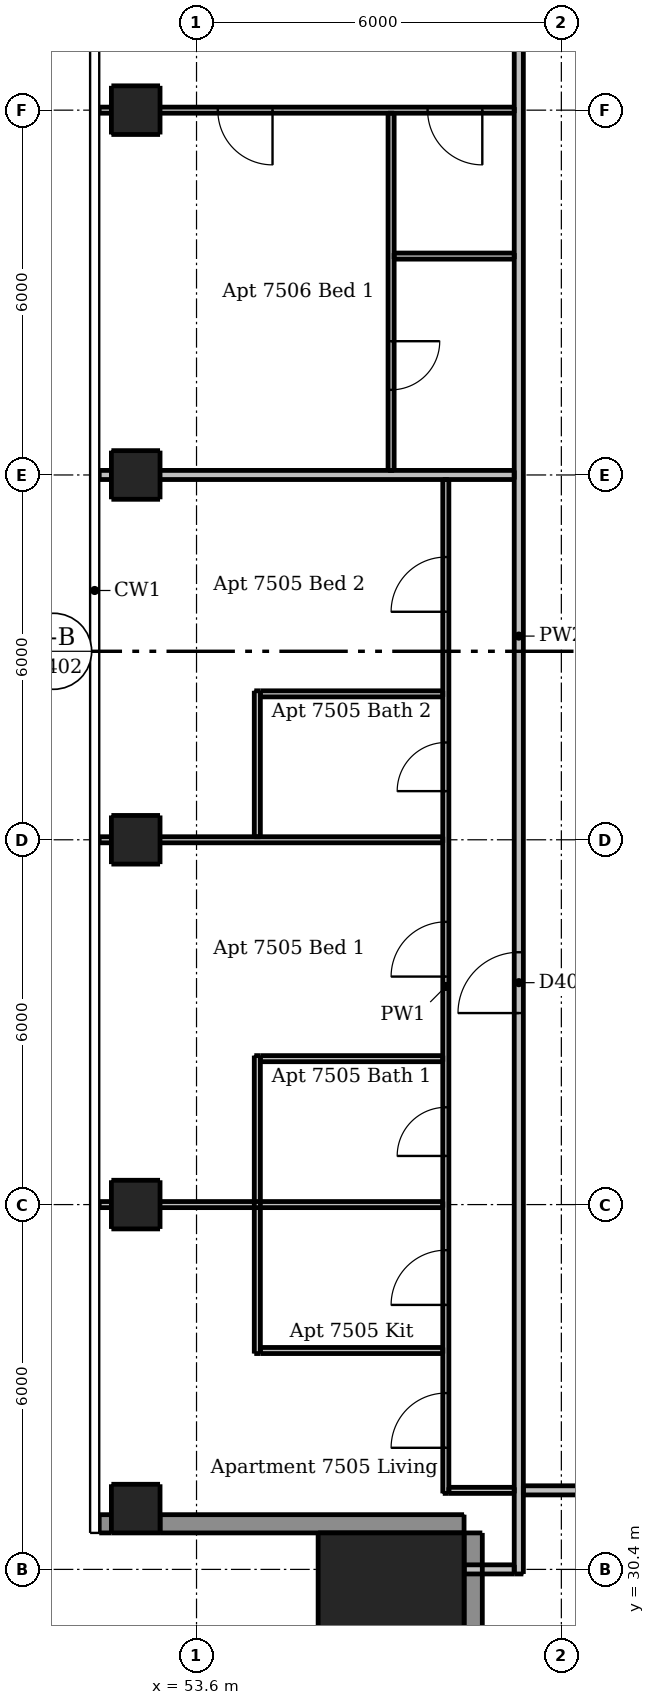
"""IFC4 building model, lengths in metres.
Left out: names, types, materials, properties, quantities, classifications, styles, units other than length and angle.
Written with IfcOpenShell. Run it as: python <this file> out.ifc"""

import sys

from ifc_helpers import new_model, si_unit, direction, frame, frame_2d, origin, origin_2d, place, context, subcontext, project, spatial, rectangle, extrude, element, fill, save


model = new_model("IFC4")
c1 = context("Model", 3, precision=1e-05, world=origin(), true_north=direction((0.0, 1.0)))
c2 = subcontext(c1, "Body", "Model", "MODEL_VIEW")
j1 = project(units=[si_unit("LENGTHUNIT", "METRE"), si_unit("PLANEANGLEUNIT", "RADIAN")], contexts=[c1])
p1 = place(None, origin())
s1 = spatial("IfcSite", under=j1, at=p1, CompositionType="ELEMENT")
p2 = place(p1, origin())
s2 = spatial("IfcBuilding", under=s1, at=p2, CompositionType="ELEMENT")
p3 = place(p2, frame((0.0, 0.0, 278.5)))
s3 = spatial("IfcBuildingStorey", under=s2, at=p3, CompositionType="ELEMENT", Elevation=278.5)
for number, where, z_axis, x_axis in (
    (1, (52.6, 31.4, 0.0), (0.0, 0.0, 1.0), (1.0, 0.0, 0.0)),
    (2, (52.6, 36.4, 0.0), (0.0, 0.0, 1.0), (1.0, 0.0, 0.0)),
    (3, (52.6, 42.4, 0.0), (0.0, 0.0, 1.0), (1.0, 0.0, 0.0)),
    (4, (52.6, 48.4, 0.0), (0.0, 0.0, 1.0), (1.0, 0.0, 0.0)),
    (5, (52.6, 54.4, 0.0), (0.0, 0.0, 1.0), (1.0, 0.0, 0.0)),
):
    element("IfcColumn", number, at=place(p3, frame(where, z_axis=z_axis, x_axis=x_axis)), inside=s3, PredefinedType="COLUMN", context=c2, shape_type="SweptSolid", body=[
        extrude(rectangle(XDim=0.8, YDim=0.8, at=origin_2d()), origin(), (0.0, 0.0, 1.0), 3.0),
    ])
p4 = place(p3, frame((56.8, 29.8, 0.0), z_axis=(0.0, 0.0, 1.0), x_axis=(1.0, 0.0, 0.0)))
e6 = element("IfcColumn", 6, at=p4, inside=s3, PredefinedType="COLUMN", context=c2, shape_type="SweptSolid", body=[
    extrude(rectangle(XDim=2.4, YDim=2.4, at=origin_2d()), origin(), (0.0, 0.0, 1.0), 3.3),
])
p5 = place(p3, frame((52.0, 31.15, 0.0), z_axis=(0.0, 0.0, 1.0), x_axis=(1.0, 0.0, 0.0)))
e7 = element("IfcWall", 7, at=p5, inside=s3, PredefinedType="SOLIDWALL", context=c2, shape_type="SweptSolid", body=[
    extrude(rectangle(XDim=0.2, YDim=0.3, at=frame_2d((0.1, 0.0))), origin(), (0.0, 0.0, 1.0), 3.0),
])
p6 = place(p3, frame((53.0, 31.15, 0.0), z_axis=(0.0, 0.0, 1.0), x_axis=(1.0, 0.0, 0.0)))
e8 = element("IfcWall", 8, at=p6, inside=s3, PredefinedType="SOLIDWALL", context=c2, shape_type="SweptSolid", body=[
    extrude(rectangle(XDim=5.0, YDim=0.3, at=frame_2d((2.5, 0.0))), origin(), (0.0, 0.0, 1.0), 3.0),
])
p7 = place(p3, frame((58.15, 31.0, 0.0), z_axis=(0.0, 0.0, 1.0), x_axis=(0.0, -1.0, 0.0)))
e9 = element("IfcWall", 9, at=p7, inside=s3, PredefinedType="SOLIDWALL", context=c2, shape_type="SweptSolid", body=[
    extrude(rectangle(XDim=6.0, YDim=0.3, at=frame_2d((3.0, 0.0))), origin(), (0.0, 0.0, 1.0), 3.0),
])
p8 = place(p7, frame((1.8, 0.0, 0.15)))
e10 = element("IfcOpeningElement", 10, at=p8, cuts=e9, PredefinedType="OPENING", context=c2, shape_type="SweptSolid", body=[
    extrude(rectangle(XDim=2.4, YDim=2.1, at=frame_2d((1.2, 1.05))), frame((0.0, 0.16, 0.0), z_axis=(0.0, -1.0, 0.0), x_axis=(1.0, 0.0, 0.0)), (0.0, 0.0, 1.0), 0.32),
])
p9 = place(p3, frame((54.6, 33.95, 0.0), z_axis=(0.0, 0.0, 1.0), x_axis=(0.0, 1.0, 0.0)))
e11 = element("IfcWall", 11, at=p9, inside=s3, PredefinedType="PARTITIONING", context=c2, shape_type="SweptSolid", body=[
    extrude(rectangle(XDim=4.9, YDim=0.1, at=frame_2d((2.45, 0.0))), origin(), (0.0, 0.0, 1.0), 3.0),
])
p10 = place(p3, frame((54.6, 42.45, 0.0), z_axis=(0.0, 0.0, 1.0), x_axis=(0.0, 1.0, 0.0)))
e12 = element("IfcWall", 12, at=p10, inside=s3, PredefinedType="PARTITIONING", context=c2, shape_type="SweptSolid", body=[
    extrude(rectangle(XDim=2.4, YDim=0.1, at=frame_2d((1.2, 0.0))), origin(), (0.0, 0.0, 1.0), 3.0),
])
p11 = place(p3, frame((56.8, 54.35, 0.0), z_axis=(0.0, 0.0, 1.0), x_axis=(0.0, -1.0, 0.0)))
e13 = element("IfcWall", 13, at=p11, inside=s3, PredefinedType="PARTITIONING", context=c2, shape_type="SweptSolid", body=[
    extrude(rectangle(XDim=5.875, YDim=0.1, at=frame_2d((2.938, 0.0))), origin(), (0.0, 0.0, 1.0), 3.0),
])
p12 = place(p11, frame((3.75, 0.0, 0.0)))
e14 = element("IfcOpeningElement", 14, at=p12, cuts=e13, PredefinedType="OPENING", context=c2, shape_type="SweptSolid", body=[
    extrude(rectangle(XDim=0.8, YDim=2.1, at=frame_2d((0.4, 1.05))), frame((0.0, 0.06, 0.0), z_axis=(0.0, -1.0, 0.0), x_axis=(1.0, 0.0, 0.0)), (0.0, 0.0, 1.0), 0.12),
])
p13 = place(p3, frame((57.7, 31.65, 0.0), z_axis=(0.0, 0.0, 1.0), x_axis=(0.0, 1.0, 0.0)))
e15 = element("IfcWall", 15, at=p13, inside=s3, PredefinedType="PARTITIONING", context=c2, shape_type="SweptSolid", body=[
    extrude(rectangle(XDim=16.675, YDim=0.1, at=frame_2d((8.337, 0.0))), origin(), (0.0, 0.0, 1.0), 3.0),
])
p14 = place(p13, frame((0.75, 0.0, 0.0)))
e16 = element("IfcOpeningElement", 16, at=p14, cuts=e15, PredefinedType="OPENING", context=c2, shape_type="SweptSolid", body=[
    extrude(rectangle(XDim=0.9, YDim=2.1, at=frame_2d((0.45, 1.05))), frame((0.0, 0.06, 0.0), z_axis=(0.0, -1.0, 0.0), x_axis=(1.0, 0.0, 0.0)), (0.0, 0.0, 1.0), 0.12),
])
p15 = place(p13, frame((3.1, 0.0, 0.0)))
e17 = element("IfcOpeningElement", 17, at=p15, cuts=e15, PredefinedType="OPENING", context=c2, shape_type="SweptSolid", body=[
    extrude(rectangle(XDim=0.9, YDim=2.1, at=frame_2d((0.45, 1.05))), frame((0.0, 0.06, 0.0), z_axis=(0.0, -1.0, 0.0), x_axis=(1.0, 0.0, 0.0)), (0.0, 0.0, 1.0), 0.12),
])
p16 = place(p13, frame((8.5, 0.0, 0.0)))
e18 = element("IfcOpeningElement", 18, at=p16, cuts=e15, PredefinedType="OPENING", context=c2, shape_type="SweptSolid", body=[
    extrude(rectangle(XDim=0.9, YDim=2.1, at=frame_2d((0.45, 1.05))), frame((0.0, 0.06, 0.0), z_axis=(0.0, -1.0, 0.0), x_axis=(1.0, 0.0, 0.0)), (0.0, 0.0, 1.0), 0.12),
])
p17 = place(p13, frame((14.5, 0.0, 0.0)))
e19 = element("IfcOpeningElement", 19, at=p17, cuts=e15, PredefinedType="OPENING", context=c2, shape_type="SweptSolid", body=[
    extrude(rectangle(XDim=0.9, YDim=2.1, at=frame_2d((0.45, 1.05))), frame((0.0, 0.06, 0.0), z_axis=(0.0, -1.0, 0.0), x_axis=(1.0, 0.0, 0.0)), (0.0, 0.0, 1.0), 0.12),
])
p18 = place(p13, frame((5.55, 0.0, 0.0)))
e20 = element("IfcOpeningElement", 20, at=p18, cuts=e15, PredefinedType="OPENING", context=c2, shape_type="SweptSolid", body=[
    extrude(rectangle(XDim=0.8, YDim=2.1, at=frame_2d((0.4, 1.05))), frame((0.0, 0.06, 0.0), z_axis=(0.0, -1.0, 0.0), x_axis=(1.0, 0.0, 0.0)), (0.0, 0.0, 1.0), 0.12),
])
p19 = place(p13, frame((11.55, 0.0, 0.0)))
e21 = element("IfcOpeningElement", 21, at=p19, cuts=e15, PredefinedType="OPENING", context=c2, shape_type="SweptSolid", body=[
    extrude(rectangle(XDim=0.8, YDim=2.1, at=frame_2d((0.4, 1.05))), frame((0.0, 0.06, 0.0), z_axis=(0.0, -1.0, 0.0), x_axis=(1.0, 0.0, 0.0)), (0.0, 0.0, 1.0), 0.12),
])
p20 = place(p3, frame((58.825, 54.4, 0.0), z_axis=(0.0, 0.0, 1.0), x_axis=(-1.0, 0.0, 0.0)))
e22 = element("IfcWall", 22, at=p20, inside=s3, PredefinedType="PARTITIONING", context=c2, shape_type="SweptSolid", body=[
    extrude(rectangle(XDim=6.825, YDim=0.1, at=frame_2d((3.413, 0.0))), origin(), (0.0, 0.0, 1.0), 2.466),
])
p21 = place(p20, frame((0.525, 0.0, 0.0)))
e23 = element("IfcOpeningElement", 23, at=p21, cuts=e22, PredefinedType="OPENING", context=c2, shape_type="SweptSolid", body=[
    extrude(rectangle(XDim=0.9, YDim=2.1, at=frame_2d((0.45, 1.05))), frame((0.0, 0.06, 0.0), z_axis=(0.0, -1.0, 0.0), x_axis=(1.0, 0.0, 0.0)), (0.0, 0.0, 1.0), 0.12),
])
p22 = place(p20, frame((3.975, 0.0, 0.0)))
e24 = element("IfcOpeningElement", 24, at=p22, cuts=e22, PredefinedType="OPENING", context=c2, shape_type="SweptSolid", body=[
    extrude(rectangle(XDim=0.9, YDim=2.1, at=frame_2d((0.45, 1.05))), frame((0.0, 0.06, 0.0), z_axis=(0.0, -1.0, 0.0), x_axis=(1.0, 0.0, 0.0)), (0.0, 0.0, 1.0), 0.12),
])
p23 = place(p3, frame((56.85, 52.0, 0.0), z_axis=(0.0, 0.0, 1.0), x_axis=(1.0, 0.0, 0.0)))
e25 = element("IfcWall", 25, at=p23, inside=s3, PredefinedType="PARTITIONING", context=c2, shape_type="SweptSolid", body=[
    extrude(rectangle(XDim=1.975, YDim=0.1, at=frame_2d((0.987, 0.0))), origin(), (0.0, 0.0, 1.0), 3.0),
])
p24 = place(p3, frame((54.65, 44.8, 0.0), z_axis=(0.0, 0.0, 1.0), x_axis=(1.0, 0.0, 0.0)))
e26 = element("IfcWall", 26, at=p24, inside=s3, PredefinedType="PARTITIONING", context=c2, shape_type="SweptSolid", body=[
    extrude(rectangle(XDim=3.0, YDim=0.1, at=frame_2d((1.5, 0.0))), origin(), (0.0, 0.0, 1.0), 3.0),
])
p25 = place(p3, frame((52.0, 42.4, 0.0), z_axis=(0.0, 0.0, 1.0), x_axis=(1.0, 0.0, 0.0)))
e27 = element("IfcWall", 27, at=p25, inside=s3, PredefinedType="PARTITIONING", context=c2, shape_type="SweptSolid", body=[
    extrude(rectangle(XDim=5.65, YDim=0.1, at=frame_2d((2.825, 0.0))), origin(), (0.0, 0.0, 1.0), 2.466),
])
p26 = place(p3, frame((54.65, 38.8, 0.0), z_axis=(0.0, 0.0, 1.0), x_axis=(1.0, 0.0, 0.0)))
e28 = element("IfcWall", 28, at=p26, inside=s3, PredefinedType="PARTITIONING", context=c2, shape_type="SweptSolid", body=[
    extrude(rectangle(XDim=3.0, YDim=0.1, at=frame_2d((1.5, 0.0))), origin(), (0.0, 0.0, 1.0), 3.0),
])
p27 = place(p3, frame((52.0, 36.4, 0.0), z_axis=(0.0, 0.0, 1.0), x_axis=(1.0, 0.0, 0.0)))
e29 = element("IfcWall", 29, at=p27, inside=s3, PredefinedType="PARTITIONING", context=c2, shape_type="SweptSolid", body=[
    extrude(rectangle(XDim=5.65, YDim=0.1, at=frame_2d((2.825, 0.0))), origin(), (0.0, 0.0, 1.0), 2.466),
])
p28 = place(p3, frame((54.65, 34.0, 0.0), z_axis=(0.0, 0.0, 1.0), x_axis=(1.0, 0.0, 0.0)))
e30 = element("IfcWall", 30, at=p28, inside=s3, PredefinedType="PARTITIONING", context=c2, shape_type="SweptSolid", body=[
    extrude(rectangle(XDim=3.0, YDim=0.1, at=frame_2d((1.5, 0.0))), origin(), (0.0, 0.0, 1.0), 3.0),
])
p29 = place(p3, frame((57.75, 31.7, 0.0), z_axis=(0.0, 0.0, 1.0), x_axis=(1.0, 0.0, 0.0)))
e31 = element("IfcWall", 31, at=p29, inside=s3, PredefinedType="PARTITIONING", context=c2, shape_type="SweptSolid", body=[
    extrude(rectangle(XDim=1.075, YDim=0.1, at=frame_2d((0.538, 0.0))), origin(), (0.0, 0.0, 1.0), 3.0),
])
p30 = place(p3, frame((58.9, 30.325, 0.0), z_axis=(0.0, 0.0, 1.0), x_axis=(0.0, 1.0, 0.0)))
e32 = element("IfcWall", 32, at=p30, inside=s3, PredefinedType="PARTITIONING", context=c2, shape_type="SweptSolid", body=[
    extrude(rectangle(XDim=30.85, YDim=0.15, at=frame_2d((15.425, 0.0))), origin(), (0.0, 0.0, 1.0), 3.0),
])
p31 = place(p30, frame((9.225, 0.0, 0.0)))
e33 = element("IfcOpeningElement", 33, at=p31, cuts=e32, PredefinedType="OPENING", context=c2, shape_type="SweptSolid", body=[
    extrude(rectangle(XDim=1.0, YDim=2.1, at=frame_2d((0.5, 1.05))), frame((0.0, 0.085, 0.0), z_axis=(0.0, -1.0, 0.0), x_axis=(1.0, 0.0, 0.0)), (0.0, 0.0, 1.0), 0.17),
])
p32 = place(p30, frame((26.925, 0.0, 0.0)))
e34 = element("IfcOpeningElement", 34, at=p32, cuts=e32, PredefinedType="OPENING", context=c2, shape_type="SweptSolid", body=[
    extrude(rectangle(XDim=1.0, YDim=2.1, at=frame_2d((0.5, 1.05))), frame((0.0, 0.085, 0.0), z_axis=(0.0, -1.0, 0.0), x_axis=(1.0, 0.0, 0.0)), (0.0, 0.0, 1.0), 0.17),
])
p33 = place(p3, frame((52.0, 48.4, 0.0), z_axis=(0.0, 0.0, 1.0), x_axis=(1.0, 0.0, 0.0)))
e35 = element("IfcWall", 35, at=p33, inside=s3, PredefinedType="PARTITIONING", context=c2, shape_type="SweptSolid", body=[
    extrude(rectangle(XDim=6.825, YDim=0.15, at=frame_2d((3.413, 0.0))), origin(), (0.0, 0.0, 1.0), 2.466),
])
p34 = place(p3, frame((89.525, 31.7, 0.0), z_axis=(0.0, 0.0, 1.0), x_axis=(-1.0, 0.0, 0.0)))
e36 = element("IfcWall", 36, at=p34, inside=s3, PredefinedType="PARTITIONING", context=c2, shape_type="SweptSolid", body=[
    extrude(rectangle(XDim=30.55, YDim=0.15, at=frame_2d((15.275, 0.0))), origin(), (0.0, 0.0, 1.0), 3.0),
])
p35 = place(p34, frame((18.425, 0.0, 0.0)))
e37 = element("IfcOpeningElement", 37, at=p35, cuts=e36, PredefinedType="OPENING", context=c2, shape_type="SweptSolid", body=[
    extrude(rectangle(XDim=1.0, YDim=2.1, at=frame_2d((0.5, 1.05))), frame((0.0, 0.085, 0.0), z_axis=(0.0, -1.0, 0.0), x_axis=(1.0, 0.0, 0.0)), (0.0, 0.0, 1.0), 0.17),
])
p36 = place(p3, frame((58.0, 30.4, 0.0), z_axis=(0.0, 0.0, 1.0), x_axis=(1.0, 0.0, 0.0)))
e38 = element("IfcWall", 38, at=p36, inside=s3, PredefinedType="PARTITIONING", context=c2, shape_type="SweptSolid", body=[
    extrude(rectangle(XDim=0.825, YDim=0.15, at=frame_2d((0.413, 0.0))), origin(), (0.0, 0.0, 1.0), 3.0),
])
p37 = place(p31, origin())
e39 = element("IfcDoor", 39, at=p37, inside=s3, OperationType="SINGLE_SWING_LEFT", PredefinedType="DOOR", context=c2, shape_type="SweptSolid", body=[
    extrude(rectangle(XDim=1.0, YDim=2.1, at=frame_2d((0.5, 1.05))), frame((0.0, 0.025, 0.0), z_axis=(0.0, -1.0, 0.0), x_axis=(1.0, 0.0, 0.0)), (0.0, 0.0, 1.0), 0.05),
])
fill(e33, e39)
p38 = place(p14, origin())
e40 = element("IfcDoor", 40, at=p38, inside=s3, OperationType="SINGLE_SWING_LEFT", PredefinedType="DOOR", context=c2, shape_type="SweptSolid", body=[
    extrude(rectangle(XDim=0.9, YDim=2.1, at=frame_2d((0.45, 1.05))), frame((0.0, 0.025, 0.0), z_axis=(0.0, -1.0, 0.0), x_axis=(1.0, 0.0, 0.0)), (0.0, 0.0, 1.0), 0.05),
])
fill(e16, e40)
p39 = place(p15, origin())
e41 = element("IfcDoor", 41, at=p39, inside=s3, OperationType="SINGLE_SWING_LEFT", PredefinedType="DOOR", context=c2, shape_type="SweptSolid", body=[
    extrude(rectangle(XDim=0.9, YDim=2.1, at=frame_2d((0.45, 1.05))), frame((0.0, 0.025, 0.0), z_axis=(0.0, -1.0, 0.0), x_axis=(1.0, 0.0, 0.0)), (0.0, 0.0, 1.0), 0.05),
])
fill(e17, e41)
p40 = place(p16, origin())
e42 = element("IfcDoor", 42, at=p40, inside=s3, OperationType="SINGLE_SWING_LEFT", PredefinedType="DOOR", context=c2, shape_type="SweptSolid", body=[
    extrude(rectangle(XDim=0.9, YDim=2.1, at=frame_2d((0.45, 1.05))), frame((0.0, 0.025, 0.0), z_axis=(0.0, -1.0, 0.0), x_axis=(1.0, 0.0, 0.0)), (0.0, 0.0, 1.0), 0.05),
])
fill(e18, e42)
p41 = place(p17, origin())
e43 = element("IfcDoor", 43, at=p41, inside=s3, OperationType="SINGLE_SWING_LEFT", PredefinedType="DOOR", context=c2, shape_type="SweptSolid", body=[
    extrude(rectangle(XDim=0.9, YDim=2.1, at=frame_2d((0.45, 1.05))), frame((0.0, 0.025, 0.0), z_axis=(0.0, -1.0, 0.0), x_axis=(1.0, 0.0, 0.0)), (0.0, 0.0, 1.0), 0.05),
])
fill(e19, e43)
p42 = place(p18, origin())
e44 = element("IfcDoor", 44, at=p42, inside=s3, OperationType="SINGLE_SWING_LEFT", PredefinedType="DOOR", context=c2, shape_type="SweptSolid", body=[
    extrude(rectangle(XDim=0.8, YDim=2.1, at=frame_2d((0.4, 1.05))), frame((0.0, 0.025, 0.0), z_axis=(0.0, -1.0, 0.0), x_axis=(1.0, 0.0, 0.0)), (0.0, 0.0, 1.0), 0.05),
])
fill(e20, e44)
p43 = place(p19, origin())
e45 = element("IfcDoor", 45, at=p43, inside=s3, OperationType="SINGLE_SWING_LEFT", PredefinedType="DOOR", context=c2, shape_type="SweptSolid", body=[
    extrude(rectangle(XDim=0.8, YDim=2.1, at=frame_2d((0.4, 1.05))), frame((0.0, 0.025, 0.0), z_axis=(0.0, -1.0, 0.0), x_axis=(1.0, 0.0, 0.0)), (0.0, 0.0, 1.0), 0.05),
])
fill(e21, e45)
p44 = place(p21, origin())
e46 = element("IfcDoor", 46, at=p44, inside=s3, OperationType="SINGLE_SWING_LEFT", PredefinedType="DOOR", context=c2, shape_type="SweptSolid", body=[
    extrude(rectangle(XDim=0.9, YDim=2.1, at=frame_2d((0.45, 1.05))), frame((0.0, 0.025, 0.0), z_axis=(0.0, -1.0, 0.0), x_axis=(1.0, 0.0, 0.0)), (0.0, 0.0, 1.0), 0.05),
])
fill(e23, e46)
p45 = place(p22, origin())
e47 = element("IfcDoor", 47, at=p45, inside=s3, OperationType="SINGLE_SWING_LEFT", PredefinedType="DOOR", context=c2, shape_type="SweptSolid", body=[
    extrude(rectangle(XDim=0.9, YDim=2.1, at=frame_2d((0.45, 1.05))), frame((0.0, 0.025, 0.0), z_axis=(0.0, -1.0, 0.0), x_axis=(1.0, 0.0, 0.0)), (0.0, 0.0, 1.0), 0.05),
])
fill(e24, e47)
p46 = place(p12, origin())
e48 = element("IfcDoor", 48, at=p46, inside=s3, OperationType="SINGLE_SWING_LEFT", PredefinedType="DOOR", context=c2, shape_type="SweptSolid", body=[
    extrude(rectangle(XDim=0.8, YDim=2.1, at=frame_2d((0.4, 1.05))), frame((0.0, 0.025, 0.0), z_axis=(0.0, -1.0, 0.0), x_axis=(1.0, 0.0, 0.0)), (0.0, 0.0, 1.0), 0.05),
])
fill(e14, e48)
save(model, sys.argv[1])
